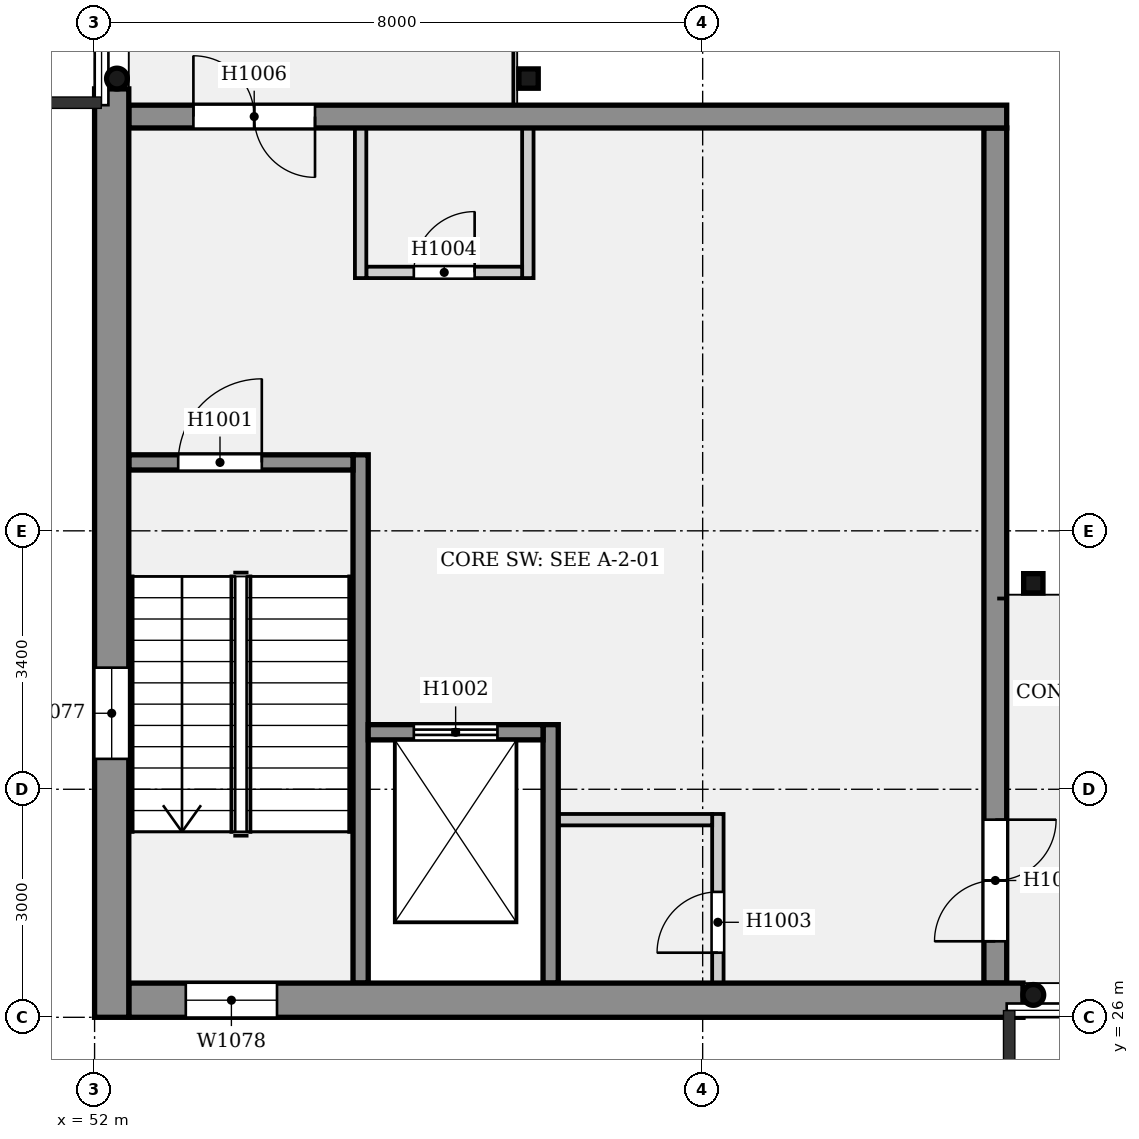
"""IFC4 building model, lengths in metres.
Left out: names, types, materials, properties, quantities, classifications, styles, units other than length and angle.
Written with IfcOpenShell. Run it as: python <this file> out.ifc"""

import sys

from ifc_helpers import new_model, si_unit, direction, frame, frame_2d, origin, origin_2d, place, context, subcontext, project, spatial, rectangle, hollow_rectangle, hollow_circle, extrude, element, fill, save


model = new_model("IFC4")
c1 = context("Model", 3, precision=1e-05, world=origin(), true_north=direction((0.0, 1.0)))
c2 = subcontext(c1, "Body", "Model", "MODEL_VIEW")
j1 = project(units=[si_unit("LENGTHUNIT", "METRE"), si_unit("PLANEANGLEUNIT", "RADIAN")], contexts=[c1])
p1 = place(None, origin())
s1 = spatial("IfcSite", under=j1, at=p1, CompositionType="ELEMENT")
p2 = place(p1, origin())
s2 = spatial("IfcBuilding", under=s1, at=p2, CompositionType="ELEMENT")
p3 = place(p2, frame((0.0, 0.0, 5.0)))
s3 = spatial("IfcBuildingStorey", under=s2, at=p3, CompositionType="ELEMENT", Elevation=5.0)
p4 = place(p3, frame((52.225, 26.0, 0.0), z_axis=(0.0, 0.0, 1.0), x_axis=(0.0, 1.0, 0.0)))
e1 = element("IfcWall", 1, at=p4, inside=s3, PredefinedType="ELEMENTEDWALL", context=c2, shape_type="SweptSolid", body=[
    extrude(rectangle(XDim=12.214, YDim=0.45, at=frame_2d((6.107, 0.0))), origin(), (0.0, 0.0, 1.0), 4.4),
])
p5 = place(p4, frame((3.4, 0.0, 0.6)))
e2 = element("IfcOpeningElement", 2, at=p5, cuts=e1, PredefinedType="OPENING", context=c2, shape_type="SweptSolid", body=[
    extrude(rectangle(XDim=1.2, YDim=3.0, at=frame_2d((0.6, 1.5))), frame((0.0, 0.235, 0.0), z_axis=(0.0, -1.0, 0.0), x_axis=(1.0, 0.0, 0.0)), (0.0, 0.0, 1.0), 0.47),
])
p6 = place(p3, frame((52.45, 26.225, 0.0), z_axis=(0.0, 0.0, 1.0), x_axis=(1.0, 0.0, 0.0)))
e3 = element("IfcWall", 3, at=p6, inside=s3, PredefinedType="ELEMENTEDWALL", context=c2, shape_type="SweptSolid", body=[
    extrude(rectangle(XDim=11.764, YDim=0.45, at=frame_2d((5.882, 0.0))), origin(), (0.0, 0.0, 1.0), 4.4),
])
p7 = place(p6, frame((0.75, 0.0, 0.6)))
e4 = element("IfcOpeningElement", 4, at=p7, cuts=e3, PredefinedType="OPENING", context=c2, shape_type="SweptSolid", body=[
    extrude(rectangle(XDim=1.2, YDim=3.0, at=frame_2d((0.6, 1.5))), frame((0.0, 0.235, 0.0), z_axis=(0.0, -1.0, 0.0), x_axis=(1.0, 0.0, 0.0)), (0.0, 0.0, 1.0), 0.47),
])
p8 = place(p3, frame((63.85, 26.45, 0.0), z_axis=(0.0, 0.0, 1.0), x_axis=(0.0, 1.0, 0.0)))
e5 = element("IfcWall", 5, at=p8, inside=s3, PredefinedType="SOLIDWALL", context=c2, shape_type="SweptSolid", body=[
    extrude(rectangle(XDim=11.25, YDim=0.3, at=frame_2d((5.625, 0.0))), origin(), (0.0, 0.0, 1.0), 4.4),
])
p9 = place(p8, frame((0.55, 0.0, 0.0)))
e6 = element("IfcOpeningElement", 6, at=p9, cuts=e5, PredefinedType="OPENING", context=c2, shape_type="SweptSolid", body=[
    extrude(rectangle(XDim=1.6, YDim=2.1, at=frame_2d((0.8, 1.05))), frame((0.0, 0.16, 0.0), z_axis=(0.0, -1.0, 0.0), x_axis=(1.0, 0.0, 0.0)), (0.0, 0.0, 1.0), 0.32),
])
p10 = place(p3, frame((52.45, 37.85, 0.0), z_axis=(0.0, 0.0, 1.0), x_axis=(1.0, 0.0, 0.0)))
e7 = element("IfcWall", 7, at=p10, inside=s3, PredefinedType="SOLIDWALL", context=c2, shape_type="SweptSolid", body=[
    extrude(rectangle(XDim=11.55, YDim=0.3, at=frame_2d((5.775, 0.0))), origin(), (0.0, 0.0, 1.0), 4.4),
])
p11 = place(p10, frame((0.85, 0.0, 0.0)))
e8 = element("IfcOpeningElement", 8, at=p11, cuts=e7, PredefinedType="OPENING", context=c2, shape_type="SweptSolid", body=[
    extrude(rectangle(XDim=1.6, YDim=2.1, at=frame_2d((0.8, 1.05))), frame((0.0, 0.16, 0.0), z_axis=(0.0, -1.0, 0.0), x_axis=(1.0, 0.0, 0.0)), (0.0, 0.0, 1.0), 0.32),
])
p12 = place(p3, frame((64.35, 26.294, 0.027), z_axis=(0.0, -0.19937683017, 0.979922894717), x_axis=(1.0, 0.0, 0.0)))
e9 = element("IfcColumn", 9, at=p12, inside=s3, PredefinedType="COLUMN", context=c2, shape_type="SweptSolid", body=[
    extrude(hollow_circle(Radius=0.136, WallThickness=0.013, at=origin_2d()), origin(), (0.0, 0.0, 1.0), 4.462),
])
p13 = place(p3, frame((64.35, 31.71, 0.0), z_axis=(0.0, 0.0, 1.0), x_axis=(1.0, 0.0, 0.0)))
e10 = element("IfcColumn", 10, at=p13, inside=s3, PredefinedType="COLUMN", context=c2, shape_type="SweptSolid", body=[
    extrude(hollow_rectangle(XDim=0.254, YDim=0.254, WallThickness=0.016, InnerFilletRadius=0.008, OuterFilletRadius=0.024, at=origin_2d()), origin(), (0.0, 0.0, 1.0), 4.4),
])
p14 = place(p3, frame((52.294, 38.35, 0.027), z_axis=(-0.19937683017, 0.0, 0.979922894717), x_axis=(0.0, -1.0, 0.0)))
e11 = element("IfcColumn", 11, at=p14, inside=s3, PredefinedType="COLUMN", context=c2, shape_type="SweptSolid", body=[
    extrude(hollow_circle(Radius=0.136, WallThickness=0.013, at=origin_2d()), origin(), (0.0, 0.0, 1.0), 4.462),
])
p15 = place(p3, frame((57.71, 38.35, 0.0), z_axis=(0.0, 0.0, 1.0), x_axis=(1.0, 0.0, 0.0)))
e12 = element("IfcColumn", 12, at=p15, inside=s3, PredefinedType="COLUMN", context=c2, shape_type="SweptSolid", body=[
    extrude(hollow_rectangle(XDim=0.254, YDim=0.254, WallThickness=0.016, InnerFilletRadius=0.008, OuterFilletRadius=0.024, at=origin_2d()), origin(), (0.0, 0.0, 1.0), 4.4),
])
p16 = place(p3, frame((55.5, 26.45, 0.0), z_axis=(0.0, 0.0, 1.0), x_axis=(0.0, 1.0, 0.0)))
e13 = element("IfcWall", 13, at=p16, inside=s3, PredefinedType="SOLIDWALL", context=c2, shape_type="SweptSolid", body=[
    extrude(rectangle(XDim=6.95, YDim=0.2, at=frame_2d((3.475, 0.0))), origin(), (0.0, 0.0, 1.0), 4.4),
])
p17 = place(p3, frame((52.45, 33.3, 0.0), z_axis=(0.0, 0.0, 1.0), x_axis=(1.0, 0.0, 0.0)))
e14 = element("IfcWall", 14, at=p17, inside=s3, PredefinedType="SOLIDWALL", context=c2, shape_type="SweptSolid", body=[
    extrude(rectangle(XDim=2.95, YDim=0.2, at=frame_2d((1.475, 0.0))), origin(), (0.0, 0.0, 1.0), 4.4),
])
p18 = place(p17, frame((0.65, 0.0, 0.0)))
e15 = element("IfcOpeningElement", 15, at=p18, cuts=e14, PredefinedType="OPENING", context=c2, shape_type="SweptSolid", body=[
    extrude(rectangle(XDim=1.1, YDim=2.1, at=frame_2d((0.55, 1.05))), frame((0.0, 0.11, 0.0), z_axis=(0.0, -1.0, 0.0), x_axis=(1.0, 0.0, 0.0)), (0.0, 0.0, 1.0), 0.22),
])
p19 = place(p3, frame((58.0, 26.45, 0.0), z_axis=(0.0, 0.0, 1.0), x_axis=(0.0, 1.0, 0.0)))
e16 = element("IfcWall", 16, at=p19, inside=s3, PredefinedType="SOLIDWALL", context=c2, shape_type="SweptSolid", body=[
    extrude(rectangle(XDim=3.4, YDim=0.2, at=frame_2d((1.7, 0.0))), origin(), (0.0, 0.0, 1.0), 4.4),
])
p20 = place(p3, frame((55.6, 29.75, 0.0), z_axis=(0.0, 0.0, 1.0), x_axis=(1.0, 0.0, 0.0)))
e17 = element("IfcWall", 17, at=p20, inside=s3, PredefinedType="SOLIDWALL", context=c2, shape_type="SweptSolid", body=[
    extrude(rectangle(XDim=2.3, YDim=0.2, at=frame_2d((1.15, 0.0))), origin(), (0.0, 0.0, 1.0), 4.4),
])
p21 = place(p20, frame((0.6, 0.0, 0.0)))
e18 = element("IfcOpeningElement", 18, at=p21, cuts=e17, PredefinedType="OPENING", context=c2, shape_type="SweptSolid", body=[
    extrude(rectangle(XDim=1.1, YDim=2.1, at=frame_2d((0.55, 1.05))), frame((0.0, 0.11, 0.0), z_axis=(0.0, -1.0, 0.0), x_axis=(1.0, 0.0, 0.0)), (0.0, 0.0, 1.0), 0.22),
])
p22 = place(p3, frame((58.1, 28.6, 0.0), z_axis=(0.0, 0.0, 1.0), x_axis=(1.0, 0.0, 0.0)))
e19 = element("IfcWall", 19, at=p22, inside=s3, PredefinedType="PARTITIONING", context=c2, shape_type="SweptSolid", body=[
    extrude(rectangle(XDim=2.025, YDim=0.15, at=frame_2d((1.012, 0.0))), origin(), (0.0, 0.0, 1.0), 4.15),
])
p23 = place(p3, frame((60.2, 26.45, 0.0), z_axis=(0.0, 0.0, 1.0), x_axis=(0.0, 1.0, 0.0)))
e20 = element("IfcWall", 20, at=p23, inside=s3, PredefinedType="PARTITIONING", context=c2, shape_type="SweptSolid", body=[
    extrude(rectangle(XDim=2.225, YDim=0.15, at=frame_2d((1.113, 0.0))), origin(), (0.0, 0.0, 1.0), 4.15),
])
p24 = place(p23, frame((0.4, 0.0, 0.0)))
e21 = element("IfcOpeningElement", 21, at=p24, cuts=e20, PredefinedType="OPENING", context=c2, shape_type="SweptSolid", body=[
    extrude(rectangle(XDim=0.8, YDim=2.1, at=frame_2d((0.4, 1.05))), frame((0.0, 0.085, 0.0), z_axis=(0.0, -1.0, 0.0), x_axis=(1.0, 0.0, 0.0)), (0.0, 0.0, 1.0), 0.17),
])
p25 = place(p3, frame((55.575, 35.8, 0.0), z_axis=(0.0, 0.0, 1.0), x_axis=(1.0, 0.0, 0.0)))
e22 = element("IfcWall", 22, at=p25, inside=s3, PredefinedType="PARTITIONING", context=c2, shape_type="SweptSolid", body=[
    extrude(rectangle(XDim=2.05, YDim=0.15, at=frame_2d((1.025, 0.0))), origin(), (0.0, 0.0, 1.0), 4.15),
])
p26 = place(p25, frame((0.625, 0.0, 0.0)))
e23 = element("IfcOpeningElement", 23, at=p26, cuts=e22, PredefinedType="OPENING", context=c2, shape_type="SweptSolid", body=[
    extrude(rectangle(XDim=0.8, YDim=2.1, at=frame_2d((0.4, 1.05))), frame((0.0, 0.085, 0.0), z_axis=(0.0, -1.0, 0.0), x_axis=(1.0, 0.0, 0.0)), (0.0, 0.0, 1.0), 0.17),
])
for number, where, z_axis, x_axis in (
    (24, (55.5, 35.725, 0.0), (0.0, 0.0, 1.0), (0.0, 1.0, 0.0)),
    (25, (57.7, 35.725, 0.0), (0.0, 0.0, 1.0), (0.0, 1.0, 0.0)),
):
    element("IfcWall", number, at=place(p3, frame(where, z_axis=z_axis, x_axis=x_axis)), inside=s3, PredefinedType="PARTITIONING", context=c2, shape_type="SweptSolid", body=[
        extrude(rectangle(XDim=1.975, YDim=0.15, at=frame_2d((0.987, 0.0))), origin(), (0.0, 0.0, 1.0), 4.15),
    ])
p27 = place(p18, origin())
e26 = element("IfcDoor", 26, at=p27, inside=s3, OperationType="SINGLE_SWING_RIGHT", PredefinedType="DOOR", context=c2, shape_type="SweptSolid", body=[
    extrude(rectangle(XDim=1.1, YDim=2.1, at=frame_2d((0.55, 1.05))), frame((0.0, 0.025, 0.0), z_axis=(0.0, -1.0, 0.0), x_axis=(1.0, 0.0, 0.0)), (0.0, 0.0, 1.0), 0.05),
])
fill(e15, e26)
p28 = place(p21, origin())
e27 = element("IfcDoor", 27, at=p28, inside=s3, OperationType="DOUBLE_DOOR_SLIDING", PredefinedType="DOOR", context=c2, shape_type="SweptSolid", body=[
    extrude(rectangle(XDim=1.1, YDim=2.1, at=frame_2d((0.55, 1.05))), frame((0.0, 0.025, 0.0), z_axis=(0.0, -1.0, 0.0), x_axis=(1.0, 0.0, 0.0)), (0.0, 0.0, 1.0), 0.05),
])
fill(e18, e27)
p29 = place(p24, origin())
e28 = element("IfcDoor", 28, at=p29, inside=s3, OperationType="SINGLE_SWING_LEFT", PredefinedType="DOOR", context=c2, shape_type="SweptSolid", body=[
    extrude(rectangle(XDim=0.8, YDim=2.1, at=frame_2d((0.4, 1.05))), frame((0.0, 0.025, 0.0), z_axis=(0.0, -1.0, 0.0), x_axis=(1.0, 0.0, 0.0)), (0.0, 0.0, 1.0), 0.05),
])
fill(e21, e28)
p30 = place(p26, origin())
e29 = element("IfcDoor", 29, at=p30, inside=s3, OperationType="SINGLE_SWING_RIGHT", PredefinedType="DOOR", context=c2, shape_type="SweptSolid", body=[
    extrude(rectangle(XDim=0.8, YDim=2.1, at=frame_2d((0.4, 1.05))), frame((0.0, 0.025, 0.0), z_axis=(0.0, -1.0, 0.0), x_axis=(1.0, 0.0, 0.0)), (0.0, 0.0, 1.0), 0.05),
])
fill(e23, e29)
p31 = place(p9, origin())
e30 = element("IfcDoor", 30, at=p31, inside=s3, OperationType="DOUBLE_DOOR_SINGLE_SWING", PredefinedType="DOOR", context=c2, shape_type="SweptSolid", body=[
    extrude(rectangle(XDim=1.6, YDim=2.1, at=frame_2d((0.8, 1.05))), frame((0.0, 0.025, 0.0), z_axis=(0.0, -1.0, 0.0), x_axis=(1.0, 0.0, 0.0)), (0.0, 0.0, 1.0), 0.05),
])
fill(e6, e30)
p32 = place(p11, origin())
e31 = element("IfcDoor", 31, at=p32, inside=s3, OperationType="DOUBLE_DOOR_SINGLE_SWING", PredefinedType="DOOR", context=c2, shape_type="SweptSolid", body=[
    extrude(rectangle(XDim=1.6, YDim=2.1, at=frame_2d((0.8, 1.05))), frame((0.0, 0.025, 0.0), z_axis=(0.0, -1.0, 0.0), x_axis=(1.0, 0.0, 0.0)), (0.0, 0.0, 1.0), 0.05),
])
fill(e8, e31)
p33 = place(p5, origin())
e32 = element("IfcWindow", 32, at=p33, inside=s3, PartitioningType="SINGLE_PANEL", PredefinedType="WINDOW", context=c2, shape_type="SweptSolid", body=[
    extrude(rectangle(XDim=1.2, YDim=3.0, at=frame_2d((0.6, 1.5))), frame((0.0, 0.03, 0.0), z_axis=(0.0, -1.0, 0.0), x_axis=(1.0, 0.0, 0.0)), (0.0, 0.0, 1.0), 0.06),
])
fill(e2, e32)
p34 = place(p7, origin())
e33 = element("IfcWindow", 33, at=p34, inside=s3, PartitioningType="SINGLE_PANEL", PredefinedType="WINDOW", context=c2, shape_type="SweptSolid", body=[
    extrude(rectangle(XDim=1.2, YDim=3.0, at=frame_2d((0.6, 1.5))), frame((0.0, 0.03, 0.0), z_axis=(0.0, -1.0, 0.0), x_axis=(1.0, 0.0, 0.0)), (0.0, 0.0, 1.0), 0.06),
])
fill(e4, e33)
save(model, sys.argv[1])
